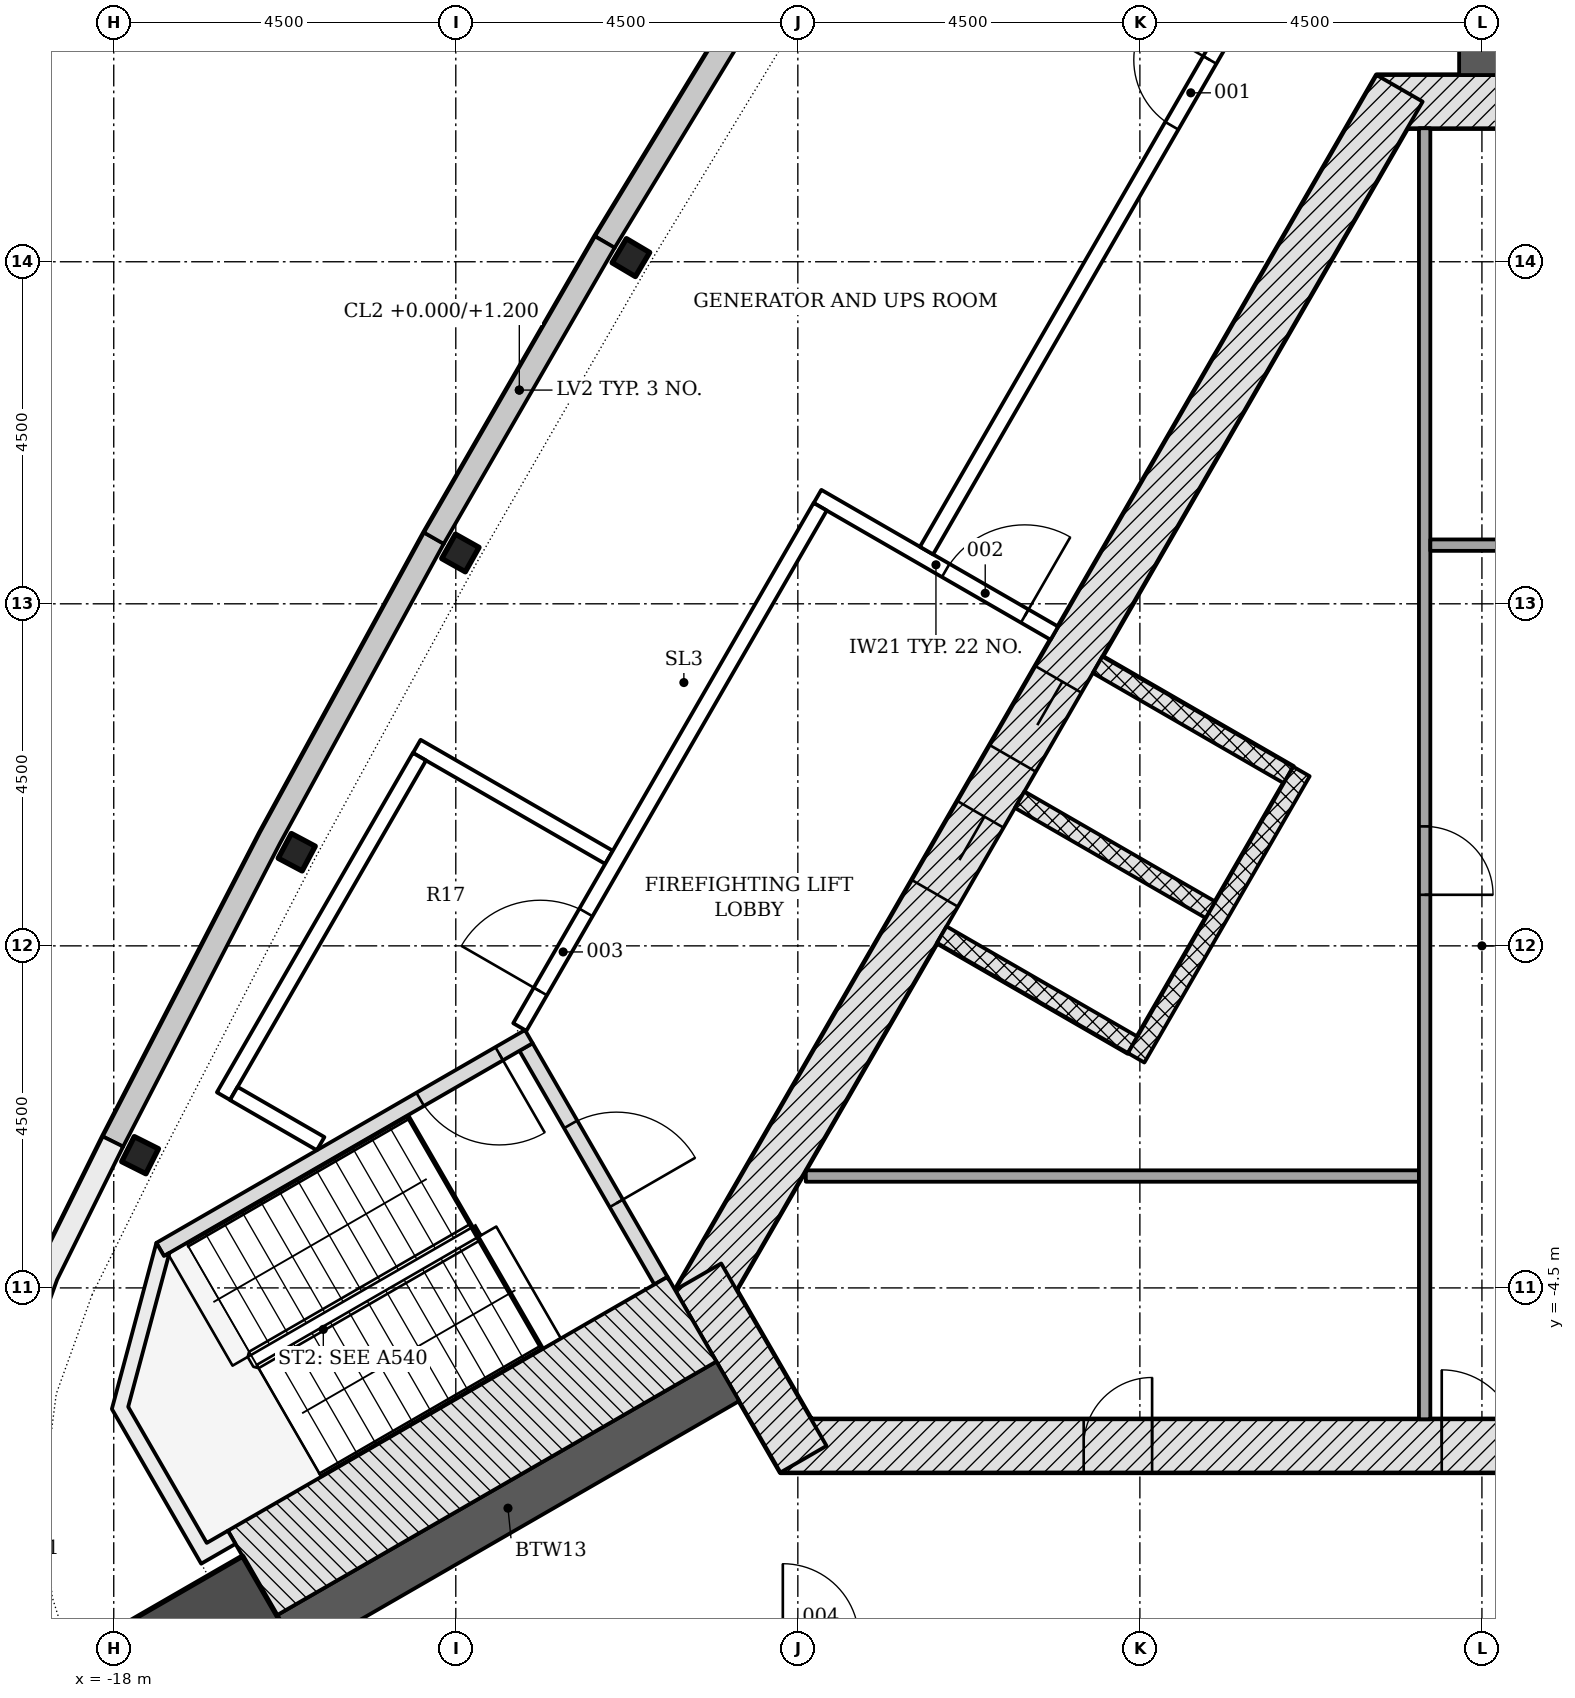
"""IFC4 building model, lengths in metres.
Left out: names, types, materials, properties, quantities, classifications, styles, units other than length and angle.
Written with IfcOpenShell. Run it as: python <this file> out.ifc"""

import sys

from ifc_helpers import new_model, si_unit, direction, frame, frame_2d, origin, origin_2d, place, context, subcontext, project, spatial, polyline, rectangle, i_section, outline, extrude, element, fill, save


model = new_model("IFC4")
c1 = context("Model", 3, precision=1e-05, world=origin(), true_north=direction((0.0, 1.0)))
c2 = subcontext(c1, "Body", "Model", "MODEL_VIEW")
j1 = project(units=[si_unit("LENGTHUNIT", "METRE"), si_unit("PLANEANGLEUNIT", "RADIAN")], contexts=[c1])
p1 = place(None, origin())
s1 = spatial("IfcSite", under=j1, at=p1, CompositionType="ELEMENT")
p2 = place(p1, origin())
s2 = spatial("IfcBuilding", under=s1, at=p2, CompositionType="ELEMENT")
p3 = place(p2, frame((0.0, 0.0, 279.6)))
s3 = spatial("IfcBuildingStorey", under=s2, at=p3, CompositionType="ELEMENT", Elevation=279.6)
p4 = place(p3, frame((-9.229, -6.578, -0.25), z_axis=(0.0, 0.0, 1.0), x_axis=(1.0, 0.0, 0.0)))
e1 = element("IfcWall", 1, at=p4, inside=s3, PredefinedType="SHEAR", context=c2, shape_type="SweptSolid", body=[
    extrude(rectangle(XDim=18.458, YDim=0.7, at=frame_2d((9.229, 0.0))), origin(), (0.0, 0.0, 1.0), 4.5),
])
p5 = place(p4, frame((8.7, 0.0, 0.25)))
e2 = element("IfcOpeningElement", 2, at=p5, cuts=e1, PredefinedType="OPENING", context=c2, shape_type="SweptSolid", body=[
    extrude(rectangle(XDim=1.0, YDim=2.1, at=frame_2d((0.5, 1.05))), frame((0.0, 0.36, 0.0), z_axis=(0.0, -1.0, 0.0), x_axis=(1.0, 0.0, 0.0)), (0.0, 0.0, 1.0), 0.72),
])
p6 = place(p4, frame((3.99, 0.0, 0.25)))
e3 = element("IfcOpeningElement", 3, at=p6, cuts=e1, PredefinedType="OPENING", context=c2, shape_type="SweptSolid", body=[
    extrude(rectangle(XDim=0.9, YDim=2.1, at=frame_2d((0.45, 1.05))), frame((0.0, 0.36, 0.0), z_axis=(0.0, -1.0, 0.0), x_axis=(1.0, 0.0, 0.0)), (0.0, 0.0, 1.0), 0.72),
])
p7 = place(p4, frame((13.539, 0.0, 0.25)))
e4 = element("IfcOpeningElement", 4, at=p7, cuts=e1, PredefinedType="OPENING", context=c2, shape_type="SweptSolid", body=[
    extrude(rectangle(XDim=0.9, YDim=2.1, at=frame_2d((0.45, 1.05))), frame((0.0, 0.36, 0.0), z_axis=(0.0, -1.0, 0.0), x_axis=(1.0, 0.0, 0.0)), (0.0, 0.0, 1.0), 0.72),
])
p8 = place(p3, frame((1.386, 11.106, -0.25), z_axis=(0.0, 0.0, 1.0), x_axis=(-1.0, 0.0, 0.0)))
e5 = element("IfcWall", 5, at=p8, inside=s3, PredefinedType="SHEAR", context=c2, shape_type="SweptSolid", body=[
    extrude(rectangle(XDim=2.771, YDim=0.7, at=frame_2d((1.386, 0.0))), origin(), (0.0, 0.0, 1.0), 4.5),
])
p9 = place(p3, frame((-1.083, 11.281, -0.25), z_axis=(0.0, 0.0, 1.0), x_axis=(-0.500001446645, -0.866024568562, 0.0)))
e6 = element("IfcWall", 6, at=p9, inside=s3, PredefinedType="SHEAR", context=c2, shape_type="SweptSolid", body=[
    extrude(rectangle(XDim=18.458, YDim=0.7, at=frame_2d((9.229, 0.0))), origin(), (0.0, 0.0, 1.0), 4.5),
])
p10 = place(p9, frame((8.979, 0.0, 0.25)))
e7 = element("IfcOpeningElement", 7, at=p10, cuts=e6, PredefinedType="OPENING", context=c2, shape_type="SweptSolid", body=[
    extrude(rectangle(XDim=1.2, YDim=2.1, at=frame_2d((0.6, 1.05))), frame((0.0, 0.36, 0.0), z_axis=(0.0, -1.0, 0.0), x_axis=(1.0, 0.0, 0.0)), (0.0, 0.0, 1.0), 0.72),
])
p11 = place(p9, frame((11.029, 0.0, 0.25)))
e8 = element("IfcOpeningElement", 8, at=p11, cuts=e6, PredefinedType="OPENING", context=c2, shape_type="SweptSolid", body=[
    extrude(rectangle(XDim=1.2, YDim=2.1, at=frame_2d((0.6, 1.05))), frame((0.0, 0.36, 0.0), z_axis=(0.0, -1.0, 0.0), x_axis=(1.0, 0.0, 0.0)), (0.0, 0.0, 1.0), 0.72),
])
p12 = place(p3, frame((-10.311, -4.353, -0.25), z_axis=(0.0, 0.0, 1.0), x_axis=(0.500042739161, -0.866000726912, 0.0)))
e9 = element("IfcWall", 9, at=p12, inside=s3, PredefinedType="SHEAR", context=c2, shape_type="SweptSolid", body=[
    extrude(rectangle(XDim=2.771, YDim=0.7, at=frame_2d((1.386, 0.0))), origin(), (0.0, 0.0, 1.0), 4.5),
])
p13 = place(p3, frame((0.0, 11.456, -0.25), z_axis=(0.0, 0.0, 1.0), x_axis=(0.0, 1.0, 0.0)))
e10 = element("IfcWall", 10, at=p13, inside=s3, PredefinedType="SHEAR", context=c2, shape_type="SweptSolid", body=[
    extrude(rectangle(XDim=6.679, YDim=0.6, at=frame_2d((3.339, 0.0))), origin(), (0.0, 0.0, 1.0), 4.5),
])
p14 = place(p3, frame((-9.922, -5.728, -0.25), z_axis=(0.0, 0.0, 1.0), x_axis=(-0.866032176823, -0.499988268569, 0.0)))
e11 = element("IfcWall", 11, at=p14, inside=s3, PredefinedType="SHEAR", context=c2, shape_type="SweptSolid", body=[
    extrude(rectangle(XDim=6.678, YDim=0.6, at=frame_2d((3.339, 0.0))), origin(), (0.0, 0.0, 1.0), 4.5),
])
p15 = place(p3, frame((-16.745, -9.667, -0.25), z_axis=(0.0, 0.0, 1.0), x_axis=(-0.866025403784, -0.5, 0.0)))
e12 = element("IfcColumn", 12, at=p15, inside=s3, PredefinedType="COLUMN", context=c2, shape_type="SweptSolid", body=[
    extrude(rectangle(XDim=2.4, YDim=2.4, at=origin_2d()), origin(), (0.0, 0.0, 1.0), 4.5),
])
for number, where, z_axis, x_axis in (
    (13, (-11.196, 9.055, -0.25), (0.0, 0.0, 1.0), (-0.51, -0.86, 0.0)),
    (14, (-13.44, 5.169, -0.25), (0.0, 0.0, 1.0), (-0.49, -0.872, 0.0)),
    (15, (-15.593, 1.232, -0.25), (0.0, 0.0, 1.0), (-0.47, -0.883, 0.0)),
    (16, (-17.654, -2.754, -0.25), (0.0, 0.0, 1.0), (-0.449, -0.894, 0.0)),
):
    element("IfcColumn", number, at=place(p3, frame(where, z_axis=z_axis, x_axis=x_axis)), inside=s3, PredefinedType="COLUMN", context=c2, shape_type="SweptSolid", body=[
        extrude(i_section(OverallWidth=0.368, OverallDepth=0.356, WebThickness=0.011, FlangeThickness=0.018, FilletRadius=0.015, at=origin_2d()), origin(), (0.0, 0.0, 1.0), 4.5),
    ])
p16 = place(p3, origin())
e17 = element("IfcWall", 17, at=p16, inside=s3, PredefinedType="NOTDEFINED", context=c2, shape_type="SweptSolid", body=[
    extrude(outline(polyline([(-6.901, 16.968), (-9.33, 13.179), (-11.669, 9.335), (-11.413, 9.179), (-9.075, 13.02), (-6.649, 16.806), (-6.901, 16.968)])), origin(), (0.0, 0.0, 1.0), 4.25),
])
p17 = place(p3, origin())
e18 = element("IfcWall", 18, at=p17, inside=s3, PredefinedType="NOTDEFINED", context=c2, shape_type="SweptSolid", body=[
    extrude(outline(polyline([(-13.919, 5.438), (-16.078, 1.49), (-18.145, -2.507), (-17.878, -2.645), (-15.813, 1.349), (-13.656, 5.294), (-13.919, 5.438)])), origin(), (0.0, 0.0, 1.0), 4.25),
])
p18 = place(p3, origin())
e19 = element("IfcWall", 19, at=p18, inside=s3, PredefinedType="NOTDEFINED", context=c2, shape_type="SweptSolid", body=[
    extrude(outline(polyline([(-11.669, 9.335), (-13.919, 5.438), (-13.659, 5.288), (-11.409, 9.185), (-11.669, 9.335)])), origin(), (0.0, 0.0, 1.0), 1.2),
])
p19 = place(p3, origin())
e20 = element("IfcWall", 20, at=p19, inside=s3, PredefinedType="NOTDEFINED", context=c2, shape_type="SweptSolid", body=[
    extrude(outline(polyline([(-18.145, -2.507), (-19.021, -4.273), (-19.538, -5.703), (-19.733, -7.21), (-19.599, -8.724), (-19.141, -10.174), (-18.381, -11.49), (-17.355, -12.611), (-16.111, -13.485), (-14.708, -14.069), (-13.211, -14.336), (-11.244, -14.46), (-11.225, -14.161), (-13.176, -14.038), (-14.623, -13.779), (-15.965, -13.22), (-17.156, -12.385), (-18.138, -11.312), (-18.865, -10.052), (-19.303, -8.665), (-19.432, -7.216), (-19.244, -5.774), (-18.745, -4.391), (-17.876, -2.64), (-18.145, -2.507)])), origin(), (0.0, 0.0, 1.0), 4.25),
])
for number, where, z_axis, x_axis in (
    (21, (-5.056, 3.699, -0.25), (0.0, 0.0, 1.0), (0.866, -0.5, 0.0)),
    (22, (-6.081, 1.923, -0.25), (0.0, 0.0, 1.0), (0.866, -0.5, 0.0)),
    (23, (-7.106, 0.148, -0.25), (0.0, 0.0, 1.0), (0.866, -0.5, 0.0)),
):
    element("IfcWall", number, at=place(p3, frame(where, z_axis=z_axis, x_axis=x_axis)), inside=s3, PredefinedType="PARTITIONING", context=c2, shape_type="SweptSolid", body=[
        extrude(rectangle(XDim=2.9, YDim=0.25, at=frame_2d((1.45, 0.0))), origin(), (0.0, 0.0, 1.0), 4.5),
    ])
p20 = place(p3, frame((-2.374, 2.294, 0.0), z_axis=(0.0, 0.0, 1.0), x_axis=(-0.499996127374, -0.866027639635, 0.0)))
e24 = element("IfcWall", 24, at=p20, inside=s3, PredefinedType="PARTITIONING", context=c2, shape_type="SweptSolid", body=[
    extrude(rectangle(XDim=4.35, YDim=0.25, at=frame_2d((2.175, 0.0))), origin(), (0.0, 0.0, 1.0), 4.25),
])
p21 = place(p3, frame((-8.895, -3.028, 0.0), z_axis=(0.0, 0.0, 1.0), x_axis=(1.0, 0.0, 0.0)))
e25 = element("IfcWall", 25, at=p21, inside=s3, PredefinedType="PARTITIONING", context=c2, shape_type="SweptSolid", body=[
    extrude(rectangle(XDim=8.066, YDim=0.15, at=frame_2d((4.033, 0.0))), origin(), (0.0, 0.0, 1.0), 4.25),
])
p22 = place(p3, frame((-0.754, 10.756, 0.0), z_axis=(0.0, 0.0, 1.0), x_axis=(0.0, -1.0, 0.0)))
e26 = element("IfcWall", 26, at=p22, inside=s3, PredefinedType="PARTITIONING", context=c2, shape_type="SweptSolid", body=[
    extrude(rectangle(XDim=16.985, YDim=0.15, at=frame_2d((8.492, 0.0))), origin(), (0.0, 0.0, 1.0), 4.25),
])
p23 = place(p22, frame((9.185, 0.0, 0.0)))
e27 = element("IfcOpeningElement", 27, at=p23, cuts=e26, PredefinedType="OPENING", context=c2, shape_type="SweptSolid", body=[
    extrude(rectangle(XDim=0.9, YDim=2.1, at=frame_2d((0.45, 1.05))), frame((0.0, 0.085, 0.0), z_axis=(0.0, -1.0, 0.0), x_axis=(1.0, 0.0, 0.0)), (0.0, 0.0, 1.0), 0.17),
])
p24 = place(p3, frame((-0.679, 5.272, 0.0), z_axis=(0.0, 0.0, 1.0), x_axis=(1.0, 0.0, 0.0)))
e28 = element("IfcWall", 28, at=p24, inside=s3, PredefinedType="PARTITIONING", context=c2, shape_type="SweptSolid", body=[
    extrude(rectangle(XDim=1.375, YDim=0.15, at=frame_2d((0.688, 0.0))), origin(), (0.0, 0.0, 1.0), 4.25),
])
p25 = place(p3, frame((-12.576, -1.331, -0.25), z_axis=(0.0, 0.0, 1.0), x_axis=(0.499970499736, -0.8660424351, 0.0)))
e29 = element("IfcWall", 29, at=p25, inside=s3, PredefinedType="SHEAR", context=c2, shape_type="SweptSolid", body=[
    extrude(rectangle(XDim=3.55, YDim=0.2, at=frame_2d((1.775, 0.0))), origin(), (0.0, 0.0, 1.0), 4.5),
])
p26 = place(p25, frame((1.175, 0.0, 0.25)))
e30 = element("IfcOpeningElement", 30, at=p26, cuts=e29, PredefinedType="OPENING", context=c2, shape_type="SweptSolid", body=[
    extrude(rectangle(XDim=1.2, YDim=2.1, at=frame_2d((0.6, 1.05))), frame((0.0, 0.11, 0.0), z_axis=(0.0, -1.0, 0.0), x_axis=(1.0, 0.0, 0.0)), (0.0, 0.0, 1.0), 0.22),
])
p27 = place(p3, frame((-12.539, -1.194, -0.25), z_axis=(0.0, 0.0, 1.0), x_axis=(-0.866045472092, -0.499965239061, 0.0)))
e31 = element("IfcWall", 31, at=p27, inside=s3, PredefinedType="SHEAR", context=c2, shape_type="SweptSolid", body=[
    extrude(rectangle(XDim=5.6, YDim=0.2, at=frame_2d((2.8, 0.0))), origin(), (0.0, 0.0, 1.0), 4.5),
])
p28 = place(p27, frame((0.45, 0.0, 0.25)))
e32 = element("IfcOpeningElement", 32, at=p28, cuts=e31, PredefinedType="OPENING", context=c2, shape_type="SweptSolid", body=[
    extrude(rectangle(XDim=1.2, YDim=2.1, at=frame_2d((0.6, 1.05))), frame((0.0, 0.11, 0.0), z_axis=(0.0, -1.0, 0.0), x_axis=(1.0, 0.0, 0.0)), (0.0, 0.0, 1.0), 0.22),
])
p29 = place(p3, frame((-10.393, -4.912, -0.25), z_axis=(0.0, 0.0, 1.0), x_axis=(-0.866025486527, -0.499999856685, 0.0)))
e33 = element("IfcWall", 33, at=p29, inside=s3, PredefinedType="SHEAR", context=c2, shape_type="SweptSolid", body=[
    extrude(rectangle(XDim=6.679, YDim=1.286, at=frame_2d((3.339, 0.0))), origin(), (0.0, 0.0, 1.0), 4.5),
])
p30 = place(p3, frame((0.0, 0.0, -0.25)))
e34 = element("IfcWall", 34, at=p30, inside=s3, PredefinedType="SHEAR", context=c2, shape_type="SweptSolid", body=[
    extrude(outline(polyline([(-17.439, -3.907), (-18.025, -6.093), (-16.85, -8.128), (-16.398, -7.867), (-16.498, -7.694), (-16.498, -7.694), (-16.777, -7.855), (-17.81, -6.065), (-17.267, -4.039), (-17.339, -4.081), (-17.339, -4.081), (-17.339, -4.081), (-17.339, -4.081), (-17.339, -4.081), (-17.339, -4.081), (-17.339, -4.081), (-17.339, -4.081), (-17.339, -4.081), (-17.339, -4.081), (-17.339, -4.081), (-17.339, -4.081), (-17.339, -4.081), (-17.339, -4.081), (-17.339, -4.081), (-17.339, -4.081), (-17.339, -4.081), (-17.439, -3.907)])), origin(), (0.0, 0.0, 1.0), 4.5),
])
p31 = place(p3, frame((-8.741, 5.913, 0.0), z_axis=(0.0, 0.0, 1.0), x_axis=(0.866017220491, -0.500014173611, 0.0)))
e35 = element("IfcWall", 35, at=p31, inside=s3, PredefinedType="PARTITIONING", context=c2, shape_type="SweptSolid", body=[
    extrude(rectangle(XDim=3.598, YDim=0.2, at=frame_2d((1.799, 0.0))), origin(), (0.0, 0.0, 1.0), 4.25),
])
p32 = place(p31, frame((1.948, 0.0, 0.0)))
e36 = element("IfcOpeningElement", 36, at=p32, cuts=e35, PredefinedType="OPENING", context=c2, shape_type="SweptSolid", body=[
    extrude(rectangle(XDim=1.2, YDim=2.1, at=frame_2d((0.6, 1.05))), frame((0.0, 0.11, 0.0), z_axis=(0.0, -1.0, 0.0), x_axis=(1.0, 0.0, 0.0)), (0.0, 0.0, 1.0), 0.22),
])
p33 = place(p3, frame((-14.013, 2.625, 0.0), z_axis=(0.0, 0.0, 1.0), x_axis=(0.866026830048, -0.499997529631, 0.0)))
e37 = element("IfcWall", 37, at=p33, inside=s3, PredefinedType="PARTITIONING", context=c2, shape_type="SweptSolid", body=[
    extrude(rectangle(XDim=2.919, YDim=0.2, at=frame_2d((1.46, 0.0))), origin(), (0.0, 0.0, 1.0), 4.25),
])
p34 = place(p3, frame((-12.658, -1.068, 0.0), z_axis=(0.0, 0.0, 1.0), x_axis=(0.499996073327, 0.866027670838, 0.0)))
e38 = element("IfcWall", 38, at=p34, inside=s3, PredefinedType="PARTITIONING", context=c2, shape_type="SweptSolid", body=[
    extrude(rectangle(XDim=7.904, YDim=0.2, at=frame_2d((3.952, 0.0))), origin(), (0.0, 0.0, 1.0), 3.702),
])
p35 = place(p34, frame((0.541, 0.0, 0.0)))
e39 = element("IfcOpeningElement", 39, at=p35, cuts=e38, PredefinedType="OPENING", context=c2, shape_type="SweptSolid", body=[
    extrude(rectangle(XDim=1.2, YDim=2.1, at=frame_2d((0.6, 1.05))), frame((0.0, 0.11, 0.0), z_axis=(0.0, -1.0, 0.0), x_axis=(1.0, 0.0, 0.0)), (0.0, 0.0, 1.0), 0.22),
])
p36 = place(p3, frame((-7.307, 5.2, 0.0), z_axis=(0.0, 0.0, 1.0), x_axis=(0.49999780173, 0.866026672953, 0.0)))
e40 = element("IfcWall", 40, at=p36, inside=s3, PredefinedType="PARTITIONING", context=c2, shape_type="SweptSolid", body=[
    extrude(rectangle(XDim=13.841, YDim=0.2, at=frame_2d((6.92, 0.0))), origin(), (0.0, 0.0, 1.0), 3.702),
])
p37 = place(p36, frame((6.454, 0.0, 0.0)))
e41 = element("IfcOpeningElement", 41, at=p37, cuts=e40, PredefinedType="OPENING", context=c2, shape_type="SweptSolid", body=[
    extrude(rectangle(XDim=1.0, YDim=2.1, at=frame_2d((0.5, 1.05))), frame((0.0, 0.11, 0.0), z_axis=(0.0, -1.0, 0.0), x_axis=(1.0, 0.0, 0.0)), (0.0, 0.0, 1.0), 0.22),
])
p38 = place(p3, frame((-13.978, 2.489, 0.0), z_axis=(0.0, 0.0, 1.0), x_axis=(-0.499983365876, -0.866035007288, 0.0)))
e42 = element("IfcWall", 42, at=p38, inside=s3, PredefinedType="PARTITIONING", context=c2, shape_type="SweptSolid", body=[
    extrude(rectangle(XDim=5.157, YDim=0.2, at=frame_2d((2.579, 0.0))), origin(), (0.0, 0.0, 1.0), 3.702),
])
p39 = place(p3, frame((-16.421, -1.942, 0.0), z_axis=(0.0, 0.0, 1.0), x_axis=(0.865991484893, -0.500058744641, 0.0)))
e43 = element("IfcWall", 43, at=p39, inside=s3, PredefinedType="PARTITIONING", context=c2, shape_type="SweptSolid", body=[
    extrude(rectangle(XDim=1.32, YDim=0.2, at=frame_2d((0.66, 0.0))), origin(), (0.0, 0.0, 1.0), 4.25),
])
p40 = place(p10, origin())
e44 = element("IfcDoor", 44, at=p40, inside=s3, OperationType="DOUBLE_DOOR_SLIDING", PredefinedType="DOOR", context=c2, shape_type="SweptSolid", body=[
    extrude(rectangle(XDim=1.2, YDim=2.1, at=frame_2d((0.6, 1.05))), frame((0.0, 0.025, 0.0), z_axis=(0.0, -1.0, 0.0), x_axis=(1.0, 0.0, 0.0)), (0.0, 0.0, 1.0), 0.05),
])
fill(e7, e44)
p41 = place(p11, origin())
e45 = element("IfcDoor", 45, at=p41, inside=s3, OperationType="DOUBLE_DOOR_SLIDING", PredefinedType="DOOR", context=c2, shape_type="SweptSolid", body=[
    extrude(rectangle(XDim=1.2, YDim=2.1, at=frame_2d((0.6, 1.05))), frame((0.0, 0.025, 0.0), z_axis=(0.0, -1.0, 0.0), x_axis=(1.0, 0.0, 0.0)), (0.0, 0.0, 1.0), 0.05),
])
fill(e8, e45)
p42 = place(p5, origin())
e46 = element("IfcDoor", 46, at=p42, inside=s3, OperationType="SINGLE_SWING_LEFT", PredefinedType="DOOR", context=c2, shape_type="SweptSolid", body=[
    extrude(rectangle(XDim=1.0, YDim=2.1, at=frame_2d((0.5, 1.05))), frame((0.0, 0.075, 0.0), z_axis=(0.0, -1.0, 0.0), x_axis=(1.0, 0.0, 0.0)), (0.0, 0.0, 1.0), 0.15),
])
fill(e2, e46)
p43 = place(p6, origin())
e47 = element("IfcDoor", 47, at=p43, inside=s3, OperationType="SINGLE_SWING_RIGHT", PredefinedType="DOOR", context=c2, shape_type="SweptSolid", body=[
    extrude(rectangle(XDim=0.9, YDim=2.1, at=frame_2d((0.45, 1.05))), frame((0.0, 0.075, 0.0), z_axis=(0.0, -1.0, 0.0), x_axis=(1.0, 0.0, 0.0)), (0.0, 0.0, 1.0), 0.15),
])
fill(e3, e47)
p44 = place(p23, origin())
e48 = element("IfcDoor", 48, at=p44, inside=s3, OperationType="SINGLE_SWING_RIGHT", PredefinedType="DOOR", context=c2, shape_type="SweptSolid", body=[
    extrude(rectangle(XDim=0.9, YDim=2.1, at=frame_2d((0.45, 1.05))), frame((0.0, 0.025, 0.0), z_axis=(0.0, -1.0, 0.0), x_axis=(1.0, 0.0, 0.0)), (0.0, 0.0, 1.0), 0.05),
])
fill(e27, e48)
p45 = place(p26, origin())
e49 = element("IfcDoor", 49, at=p45, inside=s3, OperationType="SINGLE_SWING_RIGHT", PredefinedType="DOOR", context=c2, shape_type="SweptSolid", body=[
    extrude(rectangle(XDim=1.2, YDim=2.1, at=frame_2d((0.6, 1.05))), frame((0.0, 0.025, 0.0), z_axis=(0.0, -1.0, 0.0), x_axis=(1.0, 0.0, 0.0)), (0.0, 0.0, 1.0), 0.05),
])
fill(e30, e49)
p46 = place(p28, origin())
e50 = element("IfcDoor", 50, at=p46, inside=s3, OperationType="SINGLE_SWING_LEFT", PredefinedType="DOOR", context=c2, shape_type="SweptSolid", body=[
    extrude(rectangle(XDim=1.2, YDim=2.1, at=frame_2d((0.6, 1.05))), frame((0.0, 0.025, 0.0), z_axis=(0.0, -1.0, 0.0), x_axis=(1.0, 0.0, 0.0)), (0.0, 0.0, 1.0), 0.05),
])
fill(e32, e50)
p47 = place(p37, origin())
e51 = element("IfcDoor", 51, at=p47, inside=s3, OperationType="SINGLE_SWING_RIGHT", PredefinedType="DOOR", context=c2, shape_type="SweptSolid", body=[
    extrude(rectangle(XDim=1.0, YDim=2.1, at=frame_2d((0.5, 1.05))), frame((0.0, 0.025, 0.0), z_axis=(0.0, -1.0, 0.0), x_axis=(1.0, 0.0, 0.0)), (0.0, 0.0, 1.0), 0.05),
])
fill(e41, e51)
p48 = place(p32, origin())
e52 = element("IfcDoor", 52, at=p48, inside=s3, OperationType="SINGLE_SWING_RIGHT", PredefinedType="DOOR", context=c2, shape_type="SweptSolid", body=[
    extrude(rectangle(XDim=1.2, YDim=2.1, at=frame_2d((0.6, 1.05))), frame((0.0, 0.025, 0.0), z_axis=(0.0, -1.0, 0.0), x_axis=(1.0, 0.0, 0.0)), (0.0, 0.0, 1.0), 0.05),
])
fill(e36, e52)
p49 = place(p35, origin())
e53 = element("IfcDoor", 53, at=p49, inside=s3, OperationType="SINGLE_SWING_LEFT", PredefinedType="DOOR", context=c2, shape_type="SweptSolid", body=[
    extrude(rectangle(XDim=1.2, YDim=2.1, at=frame_2d((0.6, 1.05))), frame((0.0, 0.025, 0.0), z_axis=(0.0, -1.0, 0.0), x_axis=(1.0, 0.0, 0.0)), (0.0, 0.0, 1.0), 0.05),
])
fill(e39, e53)
save(model, sys.argv[1])
